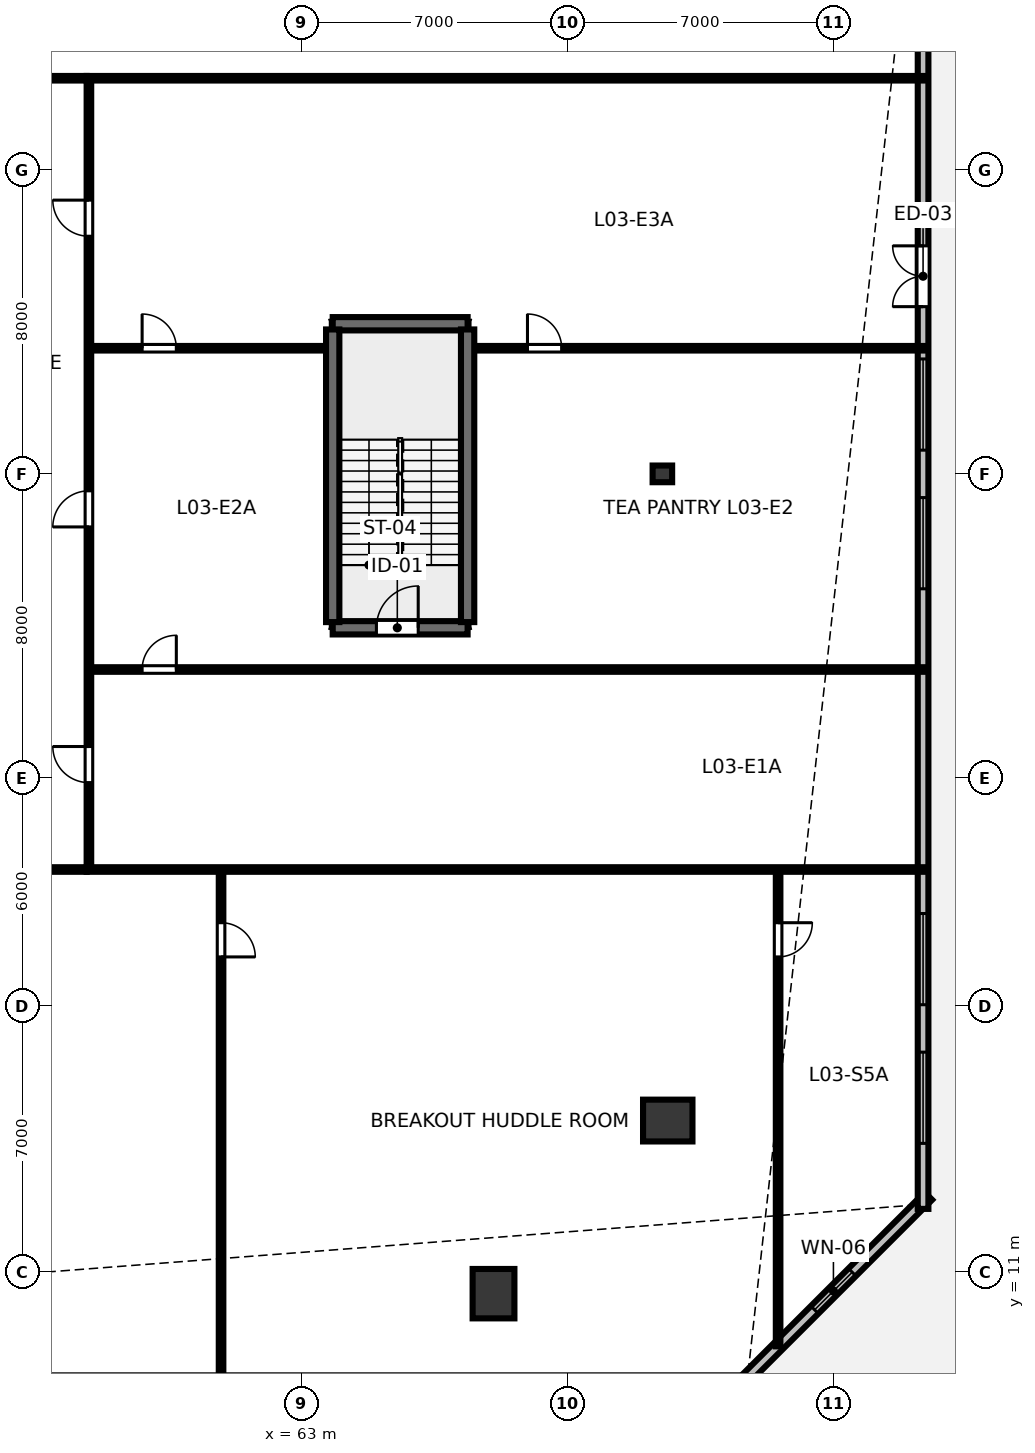
"""IFC4 building model, lengths in metres.
Left out: names, types, materials, properties, quantities, classifications, styles, units other than length and angle.
Written with IfcOpenShell. Run it as: python <this file> out.ifc"""

import sys

from ifc_helpers import new_model, si_unit, direction, frame, frame_2d, origin, origin_2d, place, context, subcontext, project, spatial, rectangle, hollow_rectangle, i_section, extrude, element, fill, save


model = new_model("IFC4")
c1 = context("Model", 3, precision=1e-05, world=origin(), true_north=direction((0.0, 1.0)))
c2 = subcontext(c1, "Body", "Model", "MODEL_VIEW")
j1 = project(units=[si_unit("LENGTHUNIT", "METRE"), si_unit("PLANEANGLEUNIT", "RADIAN")], contexts=[c1])
p1 = place(None, origin())
s1 = spatial("IfcSite", under=j1, at=p1, CompositionType="ELEMENT")
p2 = place(p1, origin())
s2 = spatial("IfcBuilding", under=s1, at=p2, CompositionType="ELEMENT")
p3 = place(p2, frame((0.0, 0.0, 14.0)))
s3 = spatial("IfcBuildingStorey", under=s2, at=p3, CompositionType="ELEMENT", Elevation=14.0)
for number, where, z_axis, x_axis in (
    (1, (68.057, 10.429, 0.0), (0.0, 0.0, 1.0), (1.0, 0.0, 0.0)),
    (2, (72.642, 14.984, 0.0), (0.0, 0.0, 1.0), (0.0, 1.0, 0.0)),
):
    element("IfcColumn", number, at=place(p3, frame(where, z_axis=z_axis, x_axis=x_axis)), inside=s3, PredefinedType="COLUMN", context=c2, shape_type="SweptSolid", body=[
        extrude(hollow_rectangle(XDim=1.1, YDim=1.3, WallThickness=0.07, at=origin_2d()), origin(), (0.0, 0.0, 1.0), 4.208),
    ])
p4 = place(p3, frame((72.5, 32.0, 0.0), z_axis=(0.0, 0.0, 1.0), x_axis=(0.0, 1.0, 0.0)))
e3 = element("IfcColumn", 3, at=p4, inside=s3, PredefinedType="COLUMN", context=c2, shape_type="SweptSolid", body=[
    extrude(i_section(OverallWidth=0.439, OverallDepth=0.514, WebThickness=0.06, FlangeThickness=0.097, FilletRadius=0.025, at=origin_2d()), origin(), (0.0, 0.0, 1.0), 4.208),
])
p5 = place(p3, frame((74.502, 8.0, 0.0), z_axis=(0.0, 0.0, 1.0), x_axis=(0.707106781187, 0.707106781187, 0.0)))
e4 = element("IfcWall", 4, at=p5, inside=s3, PredefinedType="STANDARD", context=c2, shape_type="SweptSolid", body=[
    extrude(rectangle(XDim=7.068, YDim=0.28, at=frame_2d((3.534, 0.0))), origin(), (0.0, 0.0, 1.0), 4.21),
])
p6 = place(p5, frame((2.834, 0.0, 1.5)))
e5 = element("IfcOpeningElement", 5, at=p6, cuts=e4, PredefinedType="OPENING", context=c2, shape_type="SweptSolid", body=[
    extrude(rectangle(XDim=1.4, YDim=1.2, at=frame_2d((0.7, 0.6))), frame((0.0, 0.15, 0.0), z_axis=(0.0, -1.0, 0.0), x_axis=(1.0, 0.0, 0.0)), (0.0, 0.0, 1.0), 0.3),
])
p7 = place(p3, frame((79.36, 12.66, 0.0), z_axis=(0.0, 0.0, 1.0), x_axis=(0.0, 1.0, 0.0)))
e6 = element("IfcWall", 6, at=p7, inside=s3, PredefinedType="STANDARD", context=c2, shape_type="SweptSolid", body=[
    extrude(rectangle(XDim=38.68, YDim=0.28, at=frame_2d((19.34, 0.0))), origin(), (0.0, 0.0, 1.0), 4.21),
])
p8 = place(p7, frame((23.74, 0.0, 0.0)))
e7 = element("IfcOpeningElement", 7, at=p8, cuts=e6, PredefinedType="OPENING", context=c2, shape_type="SweptSolid", body=[
    extrude(rectangle(XDim=1.6, YDim=2.15, at=frame_2d((0.8, 1.075))), frame((0.0, 0.15, 0.0), z_axis=(0.0, -1.0, 0.0), x_axis=(1.0, 0.0, 0.0)), (0.0, 0.0, 1.0), 0.3),
])
p9 = place(p7, frame((1.724, 0.0, 0.85)))
e8 = element("IfcOpeningElement", 8, at=p9, cuts=e6, PredefinedType="OPENING", context=c2, shape_type="SweptSolid", body=[
    extrude(rectangle(XDim=2.4, YDim=2.4, at=frame_2d((1.2, 1.2))), frame((0.0, 0.15, 0.0), z_axis=(0.0, -1.0, 0.0), x_axis=(1.0, 0.0, 0.0)), (0.0, 0.0, 1.0), 0.3),
])
p10 = place(p7, frame((5.372, 0.0, 0.85)))
e9 = element("IfcOpeningElement", 9, at=p10, cuts=e6, PredefinedType="OPENING", context=c2, shape_type="SweptSolid", body=[
    extrude(rectangle(XDim=2.4, YDim=2.4, at=frame_2d((1.2, 1.2))), frame((0.0, 0.15, 0.0), z_axis=(0.0, -1.0, 0.0), x_axis=(1.0, 0.0, 0.0)), (0.0, 0.0, 1.0), 0.3),
])
p11 = place(p7, frame((16.316, 0.0, 0.85)))
e10 = element("IfcOpeningElement", 10, at=p11, cuts=e6, PredefinedType="OPENING", context=c2, shape_type="SweptSolid", body=[
    extrude(rectangle(XDim=2.4, YDim=2.4, at=frame_2d((1.2, 1.2))), frame((0.0, 0.15, 0.0), z_axis=(0.0, -1.0, 0.0), x_axis=(1.0, 0.0, 0.0)), (0.0, 0.0, 1.0), 0.3),
])
p12 = place(p7, frame((19.964, 0.0, 0.85)))
e11 = element("IfcOpeningElement", 11, at=p12, cuts=e6, PredefinedType="OPENING", context=c2, shape_type="SweptSolid", body=[
    extrude(rectangle(XDim=2.4, YDim=2.4, at=frame_2d((1.2, 1.2))), frame((0.0, 0.15, 0.0), z_axis=(0.0, -1.0, 0.0), x_axis=(1.0, 0.0, 0.0)), (0.0, 0.0, 1.0), 0.3),
])
p13 = place(p7, frame((30.908, 0.0, 0.85)))
e12 = element("IfcOpeningElement", 12, at=p13, cuts=e6, PredefinedType="OPENING", context=c2, shape_type="SweptSolid", body=[
    extrude(rectangle(XDim=2.4, YDim=2.4, at=frame_2d((1.2, 1.2))), frame((0.0, 0.15, 0.0), z_axis=(0.0, -1.0, 0.0), x_axis=(1.0, 0.0, 0.0)), (0.0, 0.0, 1.0), 0.3),
])
p14 = place(p7, frame((34.556, 0.0, 0.85)))
e13 = element("IfcOpeningElement", 13, at=p14, cuts=e6, PredefinedType="OPENING", context=c2, shape_type="SweptSolid", body=[
    extrude(rectangle(XDim=2.4, YDim=2.4, at=frame_2d((1.2, 1.2))), frame((0.0, 0.15, 0.0), z_axis=(0.0, -1.0, 0.0), x_axis=(1.0, 0.0, 0.0)), (0.0, 0.0, 1.0), 0.3),
])
p15 = place(p3, frame((60.887, 21.59, 0.0), z_axis=(0.0, 0.0, 1.0), x_axis=(0.0, -1.0, 0.0)))
e14 = element("IfcWall", 14, at=p15, inside=s3, PredefinedType="PARTITIONING", context=c2, shape_type="SweptSolid", body=[
    extrude(rectangle(XDim=13.45, YDim=0.12, at=frame_2d((6.725, 0.0))), origin(), (0.0, 0.0, 1.0), 3.31),
])
p16 = place(p15, frame((1.4, 0.0, 0.0)))
e15 = element("IfcOpeningElement", 15, at=p16, cuts=e14, PredefinedType="OPENING", context=c2, shape_type="SweptSolid", body=[
    extrude(rectangle(XDim=0.9, YDim=2.15, at=frame_2d((0.45, 1.075))), frame((0.0, 0.07, 0.0), z_axis=(0.0, -1.0, 0.0), x_axis=(1.0, 0.0, 0.0)), (0.0, 0.0, 1.0), 0.14),
])
p17 = place(p3, frame((75.545, 21.59, 0.0), z_axis=(0.0, 0.0, 1.0), x_axis=(0.0, -1.0, 0.0)))
e16 = element("IfcWall", 16, at=p17, inside=s3, PredefinedType="PARTITIONING", context=c2, shape_type="SweptSolid", body=[
    extrude(rectangle(XDim=12.547, YDim=0.12, at=frame_2d((6.273, 0.0))), origin(), (0.0, 0.0, 1.0), 3.31),
])
p18 = place(p17, frame((1.4, 0.0, 0.0)))
e17 = element("IfcOpeningElement", 17, at=p18, cuts=e16, PredefinedType="OPENING", context=c2, shape_type="SweptSolid", body=[
    extrude(rectangle(XDim=0.9, YDim=2.15, at=frame_2d((0.45, 1.075))), frame((0.0, 0.07, 0.0), z_axis=(0.0, -1.0, 0.0), x_axis=(1.0, 0.0, 0.0)), (0.0, 0.0, 1.0), 0.14),
])
p19 = place(p3, frame((34.65, 21.59, 0.0), z_axis=(0.0, 0.0, 1.0), x_axis=(1.0, 0.0, 0.0)))
e18 = element("IfcWall", 18, at=p19, inside=s3, PredefinedType="PARTITIONING", context=c2, shape_type="SweptSolid", body=[
    extrude(rectangle(XDim=22.7, YDim=0.12, at=frame_2d((11.35, 0.0))), origin(), (0.0, 0.0, 1.0), 3.31),
])
p20 = place(p19, frame((1.064, 0.0, 0.0)))
e19 = element("IfcOpeningElement", 19, at=p20, cuts=e18, PredefinedType="OPENING", context=c2, shape_type="SweptSolid", body=[
    extrude(rectangle(XDim=0.95, YDim=2.15, at=frame_2d((0.475, 1.075))), frame((0.0, 0.07, 0.0), z_axis=(0.0, -1.0, 0.0), x_axis=(1.0, 0.0, 0.0)), (0.0, 0.0, 1.0), 0.14),
])
p21 = place(p19, frame((12.274, 0.0, 0.0)))
e20 = element("IfcOpeningElement", 20, at=p21, cuts=e18, PredefinedType="OPENING", context=c2, shape_type="SweptSolid", body=[
    extrude(rectangle(XDim=0.95, YDim=2.15, at=frame_2d((0.475, 1.075))), frame((0.0, 0.07, 0.0), z_axis=(0.0, -1.0, 0.0), x_axis=(1.0, 0.0, 0.0)), (0.0, 0.0, 1.0), 0.14),
])
p22 = place(p3, frame((34.65, 42.41, 0.0), z_axis=(0.0, 0.0, 1.0), x_axis=(1.0, 0.0, 0.0)))
e21 = element("IfcWall", 21, at=p22, inside=s3, PredefinedType="PARTITIONING", context=c2, shape_type="SweptSolid", body=[
    extrude(rectangle(XDim=22.7, YDim=0.12, at=frame_2d((11.35, 0.0))), origin(), (0.0, 0.0, 1.0), 3.31),
])
p23 = place(p22, frame((11.441, 0.0, 0.0)))
e22 = element("IfcOpeningElement", 22, at=p23, cuts=e21, PredefinedType="OPENING", context=c2, shape_type="SweptSolid", body=[
    extrude(rectangle(XDim=0.95, YDim=2.15, at=frame_2d((0.475, 1.075))), frame((0.0, 0.07, 0.0), z_axis=(0.0, -1.0, 0.0), x_axis=(1.0, 0.0, 0.0)), (0.0, 0.0, 1.0), 0.14),
])
p24 = place(p3, frame((57.41, 26.852, 0.0), z_axis=(0.0, 0.0, 1.0), x_axis=(1.0, 0.0, 0.0)))
e23 = element("IfcWall", 23, at=p24, inside=s3, PredefinedType="PARTITIONING", context=c2, shape_type="SweptSolid", body=[
    extrude(rectangle(XDim=21.95, YDim=0.12, at=frame_2d((10.975, 0.0))), origin(), (0.0, 0.0, 1.0), 3.31),
])
p25 = place(p24, frame((1.4, 0.0, 0.0)))
e24 = element("IfcOpeningElement", 24, at=p25, cuts=e23, PredefinedType="OPENING", context=c2, shape_type="SweptSolid", body=[
    extrude(rectangle(XDim=0.9, YDim=2.15, at=frame_2d((0.45, 1.075))), frame((0.0, 0.07, 0.0), z_axis=(0.0, -1.0, 0.0), x_axis=(1.0, 0.0, 0.0)), (0.0, 0.0, 1.0), 0.14),
])
p26 = place(p3, frame((57.41, 35.306, 0.0), z_axis=(0.0, 0.0, 1.0), x_axis=(1.0, 0.0, 0.0)))
e25 = element("IfcWall", 25, at=p26, inside=s3, PredefinedType="PARTITIONING", context=c2, shape_type="SweptSolid", body=[
    extrude(rectangle(XDim=6.24, YDim=0.12, at=frame_2d((3.12, 0.0))), origin(), (0.0, 0.0, 1.0), 3.31),
])
p27 = place(p26, frame((1.4, 0.0, 0.0)))
e26 = element("IfcOpeningElement", 26, at=p27, cuts=e25, PredefinedType="OPENING", context=c2, shape_type="SweptSolid", body=[
    extrude(rectangle(XDim=0.9, YDim=2.15, at=frame_2d((0.45, 1.075))), frame((0.0, 0.07, 0.0), z_axis=(0.0, -1.0, 0.0), x_axis=(1.0, 0.0, 0.0)), (0.0, 0.0, 1.0), 0.14),
])
p28 = place(p3, frame((67.55, 35.306, 0.0), z_axis=(0.0, 0.0, 1.0), x_axis=(1.0, 0.0, 0.0)))
e27 = element("IfcWall", 27, at=p28, inside=s3, PredefinedType="PARTITIONING", context=c2, shape_type="SweptSolid", body=[
    extrude(rectangle(XDim=11.81, YDim=0.12, at=frame_2d((5.905, 0.0))), origin(), (0.0, 0.0, 1.0), 3.31),
])
p29 = place(p28, frame((1.4, 0.0, 0.0)))
e28 = element("IfcOpeningElement", 28, at=p29, cuts=e27, PredefinedType="OPENING", context=c2, shape_type="SweptSolid", body=[
    extrude(rectangle(XDim=0.9, YDim=2.15, at=frame_2d((0.45, 1.075))), frame((0.0, 0.07, 0.0), z_axis=(0.0, -1.0, 0.0), x_axis=(1.0, 0.0, 0.0)), (0.0, 0.0, 1.0), 0.14),
])
p30 = place(p3, frame((57.41, 21.65, 0.0), z_axis=(0.0, 0.0, 1.0), x_axis=(0.0, 1.0, 0.0)))
e29 = element("IfcWall", 29, at=p30, inside=s3, PredefinedType="PARTITIONING", context=c2, shape_type="SweptSolid", body=[
    extrude(rectangle(XDim=20.7, YDim=0.12, at=frame_2d((10.35, 0.0))), origin(), (0.0, 0.0, 1.0), 3.31),
])
p31 = place(p30, frame((2.226, 0.0, 0.0)))
e30 = element("IfcOpeningElement", 30, at=p31, cuts=e29, PredefinedType="OPENING", context=c2, shape_type="SweptSolid", body=[
    extrude(rectangle(XDim=0.95, YDim=2.15, at=frame_2d((0.475, 1.075))), frame((0.0, 0.07, 0.0), z_axis=(0.0, -1.0, 0.0), x_axis=(1.0, 0.0, 0.0)), (0.0, 0.0, 1.0), 0.14),
])
p32 = place(p30, frame((8.954, 0.0, 0.0)))
e31 = element("IfcOpeningElement", 31, at=p32, cuts=e29, PredefinedType="OPENING", context=c2, shape_type="SweptSolid", body=[
    extrude(rectangle(XDim=0.95, YDim=2.15, at=frame_2d((0.475, 1.075))), frame((0.0, 0.07, 0.0), z_axis=(0.0, -1.0, 0.0), x_axis=(1.0, 0.0, 0.0)), (0.0, 0.0, 1.0), 0.14),
])
p33 = place(p30, frame((16.603, 0.0, 0.0)))
e32 = element("IfcOpeningElement", 32, at=p33, cuts=e29, PredefinedType="OPENING", context=c2, shape_type="SweptSolid", body=[
    extrude(rectangle(XDim=0.95, YDim=2.15, at=frame_2d((0.475, 1.075))), frame((0.0, 0.07, 0.0), z_axis=(0.0, -1.0, 0.0), x_axis=(1.0, 0.0, 0.0)), (0.0, 0.0, 1.0), 0.14),
])
for number, where, z_axis, x_axis in (
    (33, (57.35, 21.59, 0.0), (0.0, 0.0, 1.0), (1.0, 0.0, 0.0)),
    (34, (57.35, 42.41, 0.0), (0.0, 0.0, 1.0), (1.0, 0.0, 0.0)),
):
    element("IfcWall", number, at=place(p3, frame(where, z_axis=z_axis, x_axis=x_axis)), inside=s3, PredefinedType="PARTITIONING", context=c2, shape_type="SweptSolid", body=[
        extrude(rectangle(XDim=22.01, YDim=0.12, at=frame_2d((11.005, 0.0))), origin(), (0.0, 0.0, 1.0), 3.31),
    ])
p34 = place(p3, frame((63.825, 27.95, 0.0), z_axis=(0.0, 0.0, 1.0), x_axis=(1.0, 0.0, 0.0)))
e35 = element("IfcWall", 35, at=p34, inside=s3, PredefinedType="SHEAR", context=c2, shape_type="SweptSolid", body=[
    extrude(rectangle(XDim=3.55, YDim=0.35, at=frame_2d((1.775, 0.0))), origin(), (0.0, 0.0, 1.0), 4.5),
])
p35 = place(p34, frame((1.15, 0.0, 0.0)))
e36 = element("IfcOpeningElement", 36, at=p35, cuts=e35, PredefinedType="OPENING", context=c2, shape_type="SweptSolid", body=[
    extrude(rectangle(XDim=1.1, YDim=2.15, at=frame_2d((0.55, 1.075))), frame((0.0, 0.185, 0.0), z_axis=(0.0, -1.0, 0.0), x_axis=(1.0, 0.0, 0.0)), (0.0, 0.0, 1.0), 0.37),
])
p36 = place(p3, frame((63.825, 35.95, 0.0), z_axis=(0.0, 0.0, 1.0), x_axis=(1.0, 0.0, 0.0)))
e37 = element("IfcWall", 37, at=p36, inside=s3, PredefinedType="SHEAR", context=c2, shape_type="SweptSolid", body=[
    extrude(rectangle(XDim=3.55, YDim=0.35, at=frame_2d((1.775, 0.0))), origin(), (0.0, 0.0, 1.0), 4.5),
])
for number, where, z_axis, x_axis in (
    (38, (63.825, 28.1, 0.0), (0.0, 0.0, 1.0), (0.0, 1.0, 0.0)),
    (39, (67.375, 28.1, 0.0), (0.0, 0.0, 1.0), (0.0, 1.0, 0.0)),
):
    element("IfcWall", number, at=place(p3, frame(where, z_axis=z_axis, x_axis=x_axis)), inside=s3, PredefinedType="SHEAR", context=c2, shape_type="SweptSolid", body=[
        extrude(rectangle(XDim=7.7, YDim=0.35, at=frame_2d((3.85, 0.0))), origin(), (0.0, 0.0, 1.0), 4.5),
    ])
p37 = place(p6, origin())
e40 = element("IfcWindow", 40, at=p37, inside=s3, PartitioningType="SINGLE_PANEL", PredefinedType="WINDOW", context=c2, shape_type="SweptSolid", body=[
    extrude(rectangle(XDim=1.4, YDim=1.2, at=frame_2d((0.7, 0.6))), frame((0.0, 0.03, 0.0), z_axis=(0.0, -1.0, 0.0), x_axis=(1.0, 0.0, 0.0)), (0.0, 0.0, 1.0), 0.06),
])
fill(e5, e40)
p38 = place(p8, origin())
e41 = element("IfcDoor", 41, at=p38, inside=s3, OperationType="DOUBLE_DOOR_SINGLE_SWING", PredefinedType="DOOR", context=c2, shape_type="SweptSolid", body=[
    extrude(rectangle(XDim=1.6, YDim=2.15, at=frame_2d((0.8, 1.075))), frame((0.0, 0.025, 0.0), z_axis=(0.0, -1.0, 0.0), x_axis=(1.0, 0.0, 0.0)), (0.0, 0.0, 1.0), 0.05),
])
fill(e7, e41)
p39 = place(p9, origin())
e42 = element("IfcWindow", 42, at=p39, inside=s3, PartitioningType="SINGLE_PANEL", PredefinedType="WINDOW", context=c2, shape_type="SweptSolid", body=[
    extrude(rectangle(XDim=2.4, YDim=2.4, at=frame_2d((1.2, 1.2))), frame((0.0, 0.03, 0.0), z_axis=(0.0, -1.0, 0.0), x_axis=(1.0, 0.0, 0.0)), (0.0, 0.0, 1.0), 0.06),
])
fill(e8, e42)
p40 = place(p10, origin())
e43 = element("IfcWindow", 43, at=p40, inside=s3, PartitioningType="SINGLE_PANEL", PredefinedType="WINDOW", context=c2, shape_type="SweptSolid", body=[
    extrude(rectangle(XDim=2.4, YDim=2.4, at=frame_2d((1.2, 1.2))), frame((0.0, 0.03, 0.0), z_axis=(0.0, -1.0, 0.0), x_axis=(1.0, 0.0, 0.0)), (0.0, 0.0, 1.0), 0.06),
])
fill(e9, e43)
p41 = place(p11, origin())
e44 = element("IfcWindow", 44, at=p41, inside=s3, PartitioningType="SINGLE_PANEL", PredefinedType="WINDOW", context=c2, shape_type="SweptSolid", body=[
    extrude(rectangle(XDim=2.4, YDim=2.4, at=frame_2d((1.2, 1.2))), frame((0.0, 0.03, 0.0), z_axis=(0.0, -1.0, 0.0), x_axis=(1.0, 0.0, 0.0)), (0.0, 0.0, 1.0), 0.06),
])
fill(e10, e44)
p42 = place(p12, origin())
e45 = element("IfcWindow", 45, at=p42, inside=s3, PartitioningType="SINGLE_PANEL", PredefinedType="WINDOW", context=c2, shape_type="SweptSolid", body=[
    extrude(rectangle(XDim=2.4, YDim=2.4, at=frame_2d((1.2, 1.2))), frame((0.0, 0.03, 0.0), z_axis=(0.0, -1.0, 0.0), x_axis=(1.0, 0.0, 0.0)), (0.0, 0.0, 1.0), 0.06),
])
fill(e11, e45)
p43 = place(p16, origin())
e46 = element("IfcDoor", 46, at=p43, inside=s3, OperationType="SINGLE_SWING_RIGHT", PredefinedType="DOOR", context=c2, shape_type="SweptSolid", body=[
    extrude(rectangle(XDim=0.9, YDim=2.15, at=frame_2d((0.45, 1.075))), frame((0.0, 0.025, 0.0), z_axis=(0.0, -1.0, 0.0), x_axis=(1.0, 0.0, 0.0)), (0.0, 0.0, 1.0), 0.05),
])
fill(e15, e46)
p44 = place(p18, origin())
e47 = element("IfcDoor", 47, at=p44, inside=s3, OperationType="SINGLE_SWING_LEFT", PredefinedType="DOOR", context=c2, shape_type="SweptSolid", body=[
    extrude(rectangle(XDim=0.9, YDim=2.15, at=frame_2d((0.45, 1.075))), frame((0.0, 0.025, 0.0), z_axis=(0.0, -1.0, 0.0), x_axis=(1.0, 0.0, 0.0)), (0.0, 0.0, 1.0), 0.05),
])
fill(e17, e47)
p45 = place(p25, origin())
e48 = element("IfcDoor", 48, at=p45, inside=s3, OperationType="SINGLE_SWING_RIGHT", PredefinedType="DOOR", context=c2, shape_type="SweptSolid", body=[
    extrude(rectangle(XDim=0.9, YDim=2.15, at=frame_2d((0.45, 1.075))), frame((0.0, 0.025, 0.0), z_axis=(0.0, -1.0, 0.0), x_axis=(1.0, 0.0, 0.0)), (0.0, 0.0, 1.0), 0.05),
])
fill(e24, e48)
p46 = place(p27, origin())
e49 = element("IfcDoor", 49, at=p46, inside=s3, OperationType="SINGLE_SWING_LEFT", PredefinedType="DOOR", context=c2, shape_type="SweptSolid", body=[
    extrude(rectangle(XDim=0.9, YDim=2.15, at=frame_2d((0.45, 1.075))), frame((0.0, 0.025, 0.0), z_axis=(0.0, -1.0, 0.0), x_axis=(1.0, 0.0, 0.0)), (0.0, 0.0, 1.0), 0.05),
])
fill(e26, e49)
p47 = place(p29, origin())
e50 = element("IfcDoor", 50, at=p47, inside=s3, OperationType="SINGLE_SWING_LEFT", PredefinedType="DOOR", context=c2, shape_type="SweptSolid", body=[
    extrude(rectangle(XDim=0.9, YDim=2.15, at=frame_2d((0.45, 1.075))), frame((0.0, 0.025, 0.0), z_axis=(0.0, -1.0, 0.0), x_axis=(1.0, 0.0, 0.0)), (0.0, 0.0, 1.0), 0.05),
])
fill(e28, e50)
p48 = place(p31, origin())
e51 = element("IfcDoor", 51, at=p48, inside=s3, OperationType="SINGLE_SWING_RIGHT", PredefinedType="DOOR", context=c2, shape_type="SweptSolid", body=[
    extrude(rectangle(XDim=0.95, YDim=2.15, at=frame_2d((0.475, 1.075))), frame((0.0, 0.025, 0.0), z_axis=(0.0, -1.0, 0.0), x_axis=(1.0, 0.0, 0.0)), (0.0, 0.0, 1.0), 0.05),
])
fill(e30, e51)
p49 = place(p32, origin())
e52 = element("IfcDoor", 52, at=p49, inside=s3, OperationType="SINGLE_SWING_LEFT", PredefinedType="DOOR", context=c2, shape_type="SweptSolid", body=[
    extrude(rectangle(XDim=0.95, YDim=2.15, at=frame_2d((0.475, 1.075))), frame((0.0, 0.025, 0.0), z_axis=(0.0, -1.0, 0.0), x_axis=(1.0, 0.0, 0.0)), (0.0, 0.0, 1.0), 0.05),
])
fill(e31, e52)
p50 = place(p33, origin())
e53 = element("IfcDoor", 53, at=p50, inside=s3, OperationType="SINGLE_SWING_RIGHT", PredefinedType="DOOR", context=c2, shape_type="SweptSolid", body=[
    extrude(rectangle(XDim=0.95, YDim=2.15, at=frame_2d((0.475, 1.075))), frame((0.0, 0.025, 0.0), z_axis=(0.0, -1.0, 0.0), x_axis=(1.0, 0.0, 0.0)), (0.0, 0.0, 1.0), 0.05),
])
fill(e32, e53)
p51 = place(p35, origin())
e54 = element("IfcDoor", 54, at=p51, inside=s3, OperationType="SINGLE_SWING_RIGHT", PredefinedType="DOOR", context=c2, shape_type="SweptSolid", body=[
    extrude(rectangle(XDim=1.1, YDim=2.15, at=frame_2d((0.55, 1.075))), frame((0.0, 0.025, 0.0), z_axis=(0.0, -1.0, 0.0), x_axis=(1.0, 0.0, 0.0)), (0.0, 0.0, 1.0), 0.05),
])
fill(e36, e54)
save(model, sys.argv[1])
